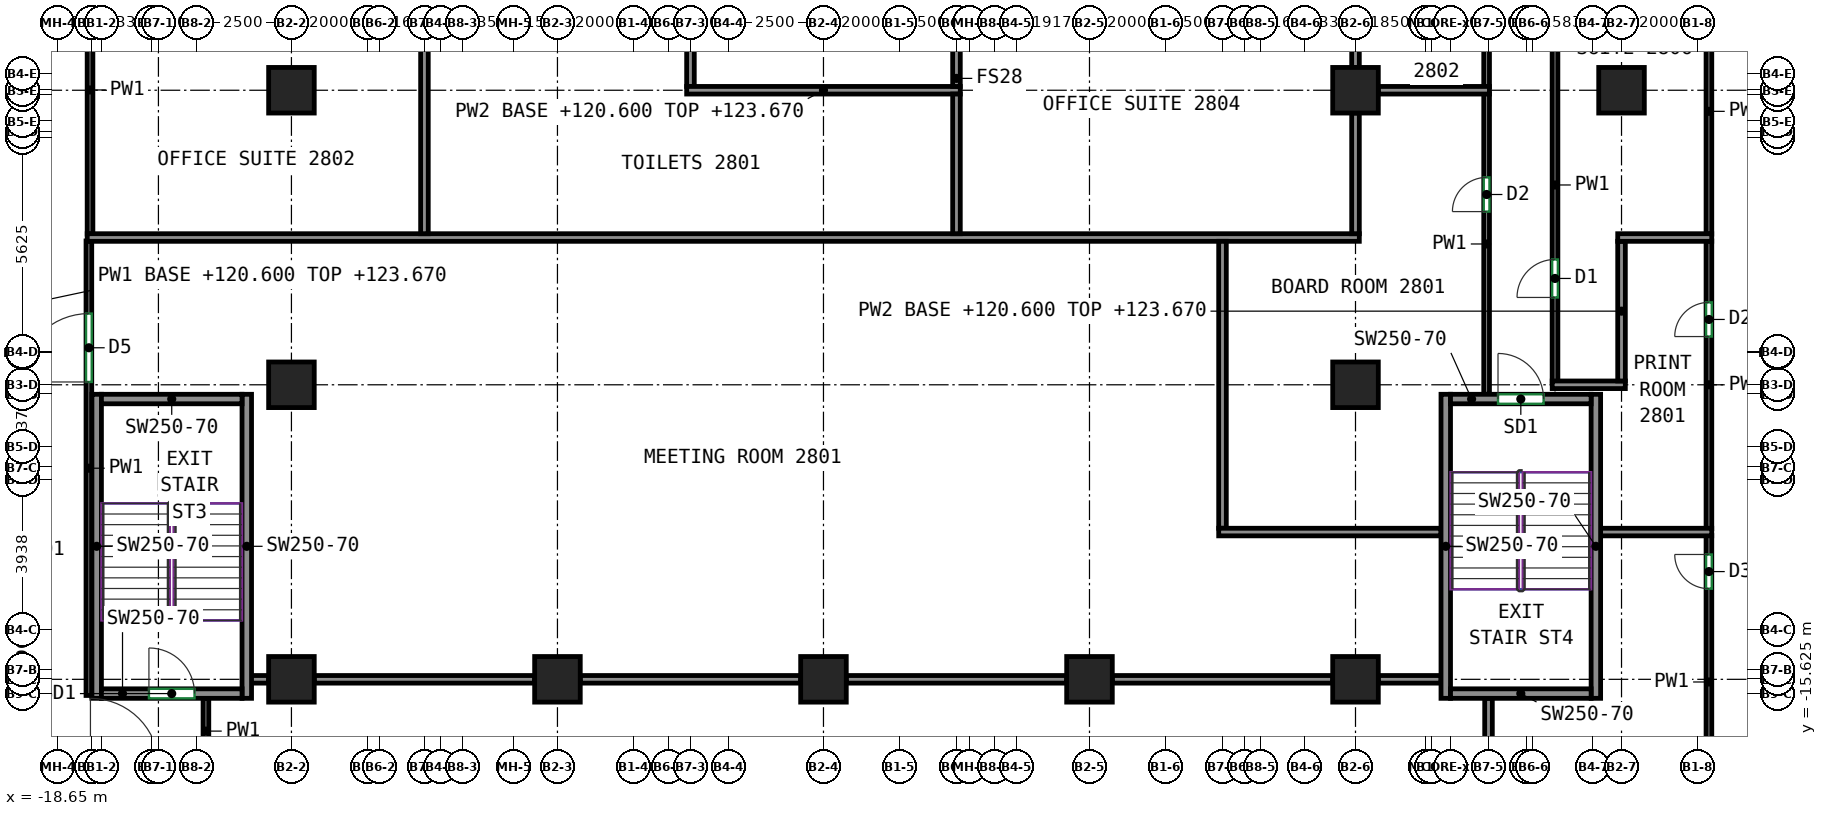
"""IFC4 building model, lengths in metres.
Left out: names, types, materials, properties, quantities, classifications, styles, units other than length and angle.
Written with IfcOpenShell. Run it as: python <this file> out.ifc"""

import sys

from ifc_helpers import new_model, si_unit, direction, frame, frame_2d, origin, origin_2d, place, context, subcontext, project, spatial, rectangle, extrude, source, transform, mapped, element, fill, save


model = new_model("IFC4")
c1 = context("Model", 3, precision=1e-05, world=origin(), true_north=direction((0.0, 1.0)))
c2 = subcontext(c1, "Body", "Model", "MODEL_VIEW")
j1 = project(units=[si_unit("LENGTHUNIT", "METRE"), si_unit("PLANEANGLEUNIT", "RADIAN")], contexts=[c1])
p1 = place(None, origin())
s1 = spatial("IfcSite", under=j1, at=p1, CompositionType="ELEMENT")
p2 = place(p1, origin())
s2 = spatial("IfcBuilding", under=s1, at=p2, CompositionType="ELEMENT")
p3 = place(p2, frame((0.0, 0.0, 120.6)))
s3 = spatial("IfcBuildingStorey", under=s2, at=p3, CompositionType="ELEMENT", Elevation=120.6)
m1 = source(origin(), c2, "Body", "SweptSolid", [
    extrude(rectangle(XDim=1.2, YDim=1.2, at=origin_2d()), origin(), (0.0, 0.0, 1.0), 3.72),
])
for number, where, z_axis, x_axis in (
    (1, (-12.5, -15.25, 0.0), (0.0, 0.0, 1.0), (1.0, 0.0, 0.0)),
    (2, (-12.5, -7.5, 0.0), (0.0, 0.0, 1.0), (1.0, 0.0, 0.0)),
    (3, (-12.5, 0.25, 0.0), (0.0, 0.0, 1.0), (1.0, 0.0, 0.0)),
    (4, (-5.5, -15.25, 0.0), (0.0, 0.0, 1.0), (1.0, 0.0, 0.0)),
    (5, (1.5, -15.25, 0.0), (0.0, 0.0, 1.0), (1.0, 0.0, 0.0)),
    (6, (8.5, -15.25, 0.0), (0.0, 0.0, 1.0), (1.0, 0.0, 0.0)),
    (7, (15.5, -15.25, 0.0), (0.0, 0.0, 1.0), (1.0, 0.0, 0.0)),
    (8, (15.5, -7.5, 0.0), (0.0, 0.0, 1.0), (1.0, 0.0, 0.0)),
    (9, (15.5, 0.25, 0.0), (0.0, 0.0, 1.0), (1.0, 0.0, 0.0)),
    (10, (22.5, 0.25, 0.0), (0.0, 0.0, 1.0), (1.0, 0.0, 0.0)),
):
    element("IfcColumn", number, at=place(p3, frame(where, z_axis=z_axis, x_axis=x_axis)), inside=s3, PredefinedType="COLUMN", context=c2, shape_type="MappedRepresentation", body=[
        mapped(m1, transform((0.0, 0.0, 0.0))),
    ])
m2 = source(origin(), c2, "Body", "SweptSolid", [
    extrude(rectangle(XDim=8.0, YDim=0.25, at=frame_2d((4.0, 0.0))), origin(), (0.0, 0.0, 1.0), 3.72),
])
for number, where, z_axis, x_axis in (
    (11, (-17.625, -15.75, 0.0), (0.0, 0.0, 1.0), (0.0, 1.0, 0.0)),
    (12, (-13.675, -15.75, 0.0), (0.0, 0.0, 1.0), (0.0, 1.0, 0.0)),
):
    element("IfcWall", number, at=place(p3, frame(where, z_axis=z_axis, x_axis=x_axis)), inside=s3, PredefinedType="SHEAR", context=c2, shape_type="MappedRepresentation", body=[
        mapped(m2, transform((0.0, 0.0, 0.0))),
    ])
m3 = source(origin(), c2, "Body", "SweptSolid", [
    extrude(rectangle(XDim=3.7, YDim=0.25, at=frame_2d((1.85, 0.0))), origin(), (0.0, 0.0, 1.0), 3.72),
])
p4 = place(p3, frame((-17.5, -15.625, 0.0), z_axis=(0.0, 0.0, 1.0), x_axis=(1.0, 0.0, 0.0)))
e13 = element("IfcWall", 13, at=p4, inside=s3, PredefinedType="SHEAR", context=c2, shape_type="MappedRepresentation", body=[
    mapped(m3, transform((0.0, 0.0, 0.0))),
])
p5 = place(p4, frame((1.25, 0.0, 0.0)))
e14 = element("IfcOpeningElement", 14, at=p5, cuts=e13, PredefinedType="OPENING", context=c2, shape_type="SweptSolid", body=[
    extrude(rectangle(XDim=1.2, YDim=2.1, at=frame_2d((0.6, 1.05))), frame((0.0, 0.135, 0.0), z_axis=(0.0, -1.0, 0.0), x_axis=(1.0, 0.0, 0.0)), (0.0, 0.0, 1.0), 0.27),
])
p6 = place(p3, frame((-17.5, -7.875, 0.0), z_axis=(0.0, 0.0, 1.0), x_axis=(1.0, 0.0, 0.0)))
e15 = element("IfcWall", 15, at=p6, inside=s3, PredefinedType="SHEAR", context=c2, shape_type="MappedRepresentation", body=[
    mapped(m3, transform((0.0, 0.0, 0.0))),
])
for number, where, z_axis, x_axis in (
    (16, (17.875, -15.75, 0.0), (0.0, 0.0, 1.0), (0.0, 1.0, 0.0)),
    (17, (21.825, -15.75, 0.0), (0.0, 0.0, 1.0), (0.0, 1.0, 0.0)),
):
    element("IfcWall", number, at=place(p3, frame(where, z_axis=z_axis, x_axis=x_axis)), inside=s3, PredefinedType="SHEAR", context=c2, shape_type="MappedRepresentation", body=[
        mapped(m2, transform((0.0, 0.0, 0.0))),
    ])
p7 = place(p3, frame((18.0, -15.625, 0.0), z_axis=(0.0, 0.0, 1.0), x_axis=(1.0, 0.0, 0.0)))
e18 = element("IfcWall", 18, at=p7, inside=s3, PredefinedType="SHEAR", context=c2, shape_type="MappedRepresentation", body=[
    mapped(m3, transform((0.0, 0.0, 0.0))),
])
p8 = place(p3, frame((18.0, -7.875, 0.0), z_axis=(0.0, 0.0, 1.0), x_axis=(1.0, 0.0, 0.0)))
e19 = element("IfcWall", 19, at=p8, inside=s3, PredefinedType="SHEAR", context=c2, shape_type="MappedRepresentation", body=[
    mapped(m3, transform((0.0, 0.0, 0.0))),
])
p9 = place(p8, frame((1.25, 0.0, 0.0)))
e20 = element("IfcOpeningElement", 20, at=p9, cuts=e19, PredefinedType="OPENING", context=c2, shape_type="SweptSolid", body=[
    extrude(rectangle(XDim=1.2, YDim=2.1, at=frame_2d((0.6, 1.05))), frame((0.0, 0.135, 0.0), z_axis=(0.0, -1.0, 0.0), x_axis=(1.0, 0.0, 0.0)), (0.0, 0.0, 1.0), 0.27),
])
p10 = place(p3, frame((-17.8, -3.535, 0.0), z_axis=(0.0, 0.0, 1.0), x_axis=(0.0, 1.0, 0.0)))
e21 = element("IfcWall", 21, at=p10, inside=s3, PredefinedType="PARTITIONING", context=c2, shape_type="SweptSolid", body=[
    extrude(rectangle(XDim=7.585, YDim=0.15, at=frame_2d((3.792, 0.0))), origin(), (0.0, 0.0, 1.0), 3.72),
])
p11 = place(p10, frame((5.067, 0.0, 0.0)))
e22 = element("IfcOpeningElement", 22, at=p11, cuts=e21, PredefinedType="OPENING", context=c2, shape_type="SweptSolid", body=[
    extrude(rectangle(XDim=1.0, YDim=2.1, at=frame_2d((0.5, 1.05))), frame((0.0, 0.085, 0.0), z_axis=(0.0, -1.0, 0.0), x_axis=(1.0, 0.0, 0.0)), (0.0, 0.0, 1.0), 0.17),
])
p12 = place(p3, frame((-17.83, -15.675, 0.0), z_axis=(0.0, 0.0, 1.0), x_axis=(0.0, 1.0, 0.0)))
e23 = element("IfcWall", 23, at=p12, inside=s3, PredefinedType="PARTITIONING", context=c2, shape_type="SweptSolid", body=[
    extrude(rectangle(XDim=11.96, YDim=0.15, at=frame_2d((5.98, 0.0))), origin(), (0.0, 0.0, 1.0), 3.72),
])
p13 = place(p12, frame((8.249, 0.0, 0.0)))
e24 = element("IfcOpeningElement", 24, at=p13, cuts=e23, PredefinedType="OPENING", context=c2, shape_type="SweptSolid", body=[
    extrude(rectangle(XDim=1.8, YDim=2.1, at=frame_2d((0.9, 1.05))), frame((0.0, 0.085, 0.0), z_axis=(0.0, -1.0, 0.0), x_axis=(1.0, 0.0, 0.0)), (0.0, 0.0, 1.0), 0.17),
])
p14 = place(p3, frame((-14.75, -17.475, 0.0), z_axis=(0.0, 0.0, 1.0), x_axis=(0.0, 1.0, 0.0)))
e25 = element("IfcWall", 25, at=p14, inside=s3, PredefinedType="PARTITIONING", context=c2, shape_type="SweptSolid", body=[
    extrude(rectangle(XDim=1.725, YDim=0.15, at=frame_2d((0.863, 0.0))), origin(), (0.0, 0.0, 1.0), 3.72),
])
p15 = place(p3, frame((18.95, -7.75, 0.0), z_axis=(0.0, 0.0, 1.0), x_axis=(0.0, 1.0, 0.0)))
e26 = element("IfcWall", 26, at=p15, inside=s3, PredefinedType="PARTITIONING", context=c2, shape_type="SweptSolid", body=[
    extrude(rectangle(XDim=7.91, YDim=0.15, at=frame_2d((3.955, 0.0))), origin(), (0.0, 0.0, 1.0), 3.72),
])
p16 = place(p15, frame((4.807, 0.0, 0.0)))
e27 = element("IfcOpeningElement", 27, at=p16, cuts=e26, PredefinedType="OPENING", context=c2, shape_type="SweptSolid", body=[
    extrude(rectangle(XDim=0.9, YDim=2.1, at=frame_2d((0.45, 1.05))), frame((0.0, 0.085, 0.0), z_axis=(0.0, -1.0, 0.0), x_axis=(1.0, 0.0, 0.0)), (0.0, 0.0, 1.0), 0.17),
])
p17 = place(p3, frame((24.8, -19.175, 0.0), z_axis=(0.0, 0.0, 1.0), x_axis=(0.0, 1.0, 0.0)))
e28 = element("IfcWall", 28, at=p17, inside=s3, PredefinedType="PARTITIONING", context=c2, shape_type="SweptSolid", body=[
    extrude(rectangle(XDim=7.71, YDim=0.15, at=frame_2d((3.855, 0.0))), origin(), (0.0, 0.0, 1.0), 3.72),
])
p18 = place(p17, frame((6.31, 0.0, 0.0)))
e29 = element("IfcOpeningElement", 29, at=p18, cuts=e28, PredefinedType="OPENING", context=c2, shape_type="SweptSolid", body=[
    extrude(rectangle(XDim=0.9, YDim=2.1, at=frame_2d((0.45, 1.05))), frame((0.0, 0.085, 0.0), z_axis=(0.0, -1.0, 0.0), x_axis=(1.0, 0.0, 0.0)), (0.0, 0.0, 1.0), 0.17),
])
p19 = place(p3, frame((24.8, -11.285, 0.0), z_axis=(0.0, 0.0, 1.0), x_axis=(0.0, 1.0, 0.0)))
e30 = element("IfcWall", 30, at=p19, inside=s3, PredefinedType="PARTITIONING", context=c2, shape_type="SweptSolid", body=[
    extrude(rectangle(XDim=7.57, YDim=0.15, at=frame_2d((3.785, 0.0))), origin(), (0.0, 0.0, 1.0), 3.72),
])
p20 = place(p19, frame((5.054, 0.0, 0.0)))
e31 = element("IfcOpeningElement", 31, at=p20, cuts=e30, PredefinedType="OPENING", context=c2, shape_type="SweptSolid", body=[
    extrude(rectangle(XDim=0.9, YDim=2.1, at=frame_2d((0.45, 1.05))), frame((0.0, 0.085, 0.0), z_axis=(0.0, -1.0, 0.0), x_axis=(1.0, 0.0, 0.0)), (0.0, 0.0, 1.0), 0.17),
])
p21 = place(p3, frame((24.8, -3.535, 0.0), z_axis=(0.0, 0.0, 1.0), x_axis=(0.0, 1.0, 0.0)))
e32 = element("IfcWall", 32, at=p21, inside=s3, PredefinedType="PARTITIONING", context=c2, shape_type="SweptSolid", body=[
    extrude(rectangle(XDim=6.46, YDim=0.15, at=frame_2d((3.23, 0.0))), origin(), (0.0, 0.0, 1.0), 3.72),
])
p22 = place(p3, frame((20.75, -7.41, 0.0), z_axis=(0.0, 0.0, 1.0), x_axis=(0.0, 1.0, 0.0)))
e33 = element("IfcWall", 33, at=p22, inside=s3, PredefinedType="PARTITIONING", context=c2, shape_type="SweptSolid", body=[
    extrude(rectangle(XDim=10.335, YDim=0.15, at=frame_2d((5.167, 0.0))), origin(), (0.0, 0.0, 1.0), 3.72),
])
p23 = place(p22, frame((2.208, 0.0, 0.0)))
e34 = element("IfcOpeningElement", 34, at=p23, cuts=e33, PredefinedType="OPENING", context=c2, shape_type="SweptSolid", body=[
    extrude(rectangle(XDim=1.0, YDim=2.1, at=frame_2d((0.5, 1.05))), frame((0.0, 0.085, 0.0), z_axis=(0.0, -1.0, 0.0), x_axis=(1.0, 0.0, 0.0)), (0.0, 0.0, 1.0), 0.17),
])
p24 = place(p3, frame((18.95, 0.34, 0.0), z_axis=(0.0, 0.0, 1.0), x_axis=(0.0, 1.0, 0.0)))
e35 = element("IfcWall", 35, at=p24, inside=s3, PredefinedType="PARTITIONING", context=c2, shape_type="SweptSolid", body=[
    extrude(rectangle(XDim=2.908, YDim=0.15, at=frame_2d((1.454, 0.0))), origin(), (0.0, 0.0, 1.0), 3.72),
])
p25 = place(p3, frame((-17.874, -3.625, 0.0), z_axis=(0.0, 0.0, 1.0), x_axis=(1.0, 0.0, 0.0)))
e36 = element("IfcWall", 36, at=p25, inside=s3, PredefinedType="PARTITIONING", context=c2, shape_type="SweptSolid", body=[
    extrude(rectangle(XDim=33.474, YDim=0.2, at=frame_2d((16.737, 0.0))), origin(), (0.0, 0.0, 1.0), 3.72),
])
p26 = place(p3, frame((-9.0, -3.525, 0.0), z_axis=(0.0, 0.0, 1.0), x_axis=(0.0, 1.0, 0.0)))
e37 = element("IfcWall", 37, at=p26, inside=s3, PredefinedType="PARTITIONING", context=c2, shape_type="SweptSolid", body=[
    extrude(rectangle(XDim=6.399, YDim=0.2, at=frame_2d((3.199, 0.0))), origin(), (0.0, 0.0, 1.0), 3.72),
])
p27 = place(p3, frame((16.1, -15.25, 0.0), z_axis=(0.0, 0.0, 1.0), x_axis=(1.0, 0.0, 0.0)))
e38 = element("IfcWall", 38, at=p27, inside=s3, PredefinedType="PARTITIONING", context=c2, shape_type="SweptSolid", body=[
    extrude(rectangle(XDim=1.65, YDim=0.2, at=frame_2d((0.825, 0.0))), origin(), (0.0, 0.0, 1.0), 3.72),
])
for number, where, z_axis, x_axis in (
    (39, (9.1, -15.25, 0.0), (0.0, 0.0, 1.0), (1.0, 0.0, 0.0)),
    (40, (2.1, -15.25, 0.0), (0.0, 0.0, 1.0), (1.0, 0.0, 0.0)),
    (41, (-4.9, -15.25, 0.0), (0.0, 0.0, 1.0), (1.0, 0.0, 0.0)),
    (42, (-11.9, -15.25, 0.0), (0.0, 0.0, 1.0), (1.0, 0.0, 0.0)),
):
    element("IfcWall", number, at=place(p3, frame(where, z_axis=z_axis, x_axis=x_axis)), inside=s3, PredefinedType="PARTITIONING", context=c2, shape_type="SweptSolid", body=[
        extrude(rectangle(XDim=5.8, YDim=0.2, at=frame_2d((2.9, 0.0))), origin(), (0.0, 0.0, 1.0), 3.72),
    ])
p28 = place(p3, frame((-13.6, -15.25, 0.0), z_axis=(0.0, 0.0, 1.0), x_axis=(1.0, 0.0, 0.0)))
e43 = element("IfcWall", 43, at=p28, inside=s3, PredefinedType="PARTITIONING", context=c2, shape_type="SweptSolid", body=[
    extrude(rectangle(XDim=0.5, YDim=0.2, at=frame_2d((0.25, 0.0))), origin(), (0.0, 0.0, 1.0), 3.72),
])
p29 = place(p3, frame((12.0, -11.275, 0.0), z_axis=(0.0, 0.0, 1.0), x_axis=(0.0, 1.0, 0.0)))
e44 = element("IfcWall", 44, at=p29, inside=s3, PredefinedType="PARTITIONING", context=c2, shape_type="SweptSolid", body=[
    extrude(rectangle(XDim=7.55, YDim=0.2, at=frame_2d((3.775, 0.0))), origin(), (0.0, 0.0, 1.0), 3.72),
])
p30 = place(p3, frame((11.9, -11.375, 0.0), z_axis=(0.0, 0.0, 1.0), x_axis=(1.0, 0.0, 0.0)))
e45 = element("IfcWall", 45, at=p30, inside=s3, PredefinedType="PARTITIONING", context=c2, shape_type="SweptSolid", body=[
    extrude(rectangle(XDim=5.85, YDim=0.2, at=frame_2d((2.925, 0.0))), origin(), (0.0, 0.0, 1.0), 3.72),
])
p31 = place(p3, frame((19.0, -22.75, 0.0), z_axis=(0.0, 0.0, 1.0), x_axis=(0.0, 1.0, 0.0)))
e46 = element("IfcWall", 46, at=p31, inside=s3, PredefinedType="PARTITIONING", context=c2, shape_type="SweptSolid", body=[
    extrude(rectangle(XDim=7.0, YDim=0.2, at=frame_2d((3.5, 0.0))), origin(), (0.0, 0.0, 1.0), 3.72),
])
p32 = place(p3, frame((-2.0, 0.35, 0.0), z_axis=(0.0, 0.0, 1.0), x_axis=(0.0, 1.0, 0.0)))
e47 = element("IfcWall", 47, at=p32, inside=s3, PredefinedType="PARTITIONING", context=c2, shape_type="SweptSolid", body=[
    extrude(rectangle(XDim=2.524, YDim=0.2, at=frame_2d((1.262, 0.0))), origin(), (0.0, 0.0, 1.0), 3.72),
])
p33 = place(p3, frame((-2.1, 0.25, 0.0), z_axis=(0.0, 0.0, 1.0), x_axis=(1.0, 0.0, 0.0)))
e48 = element("IfcWall", 48, at=p33, inside=s3, PredefinedType="PARTITIONING", context=c2, shape_type="SweptSolid", body=[
    extrude(rectangle(XDim=7.2, YDim=0.2, at=frame_2d((3.6, 0.0))), origin(), (0.0, 0.0, 1.0), 3.07),
])
p34 = place(p3, frame((5.0, -3.525, 0.0), z_axis=(0.0, 0.0, 1.0), x_axis=(0.0, 1.0, 0.0)))
e49 = element("IfcWall", 49, at=p34, inside=s3, PredefinedType="PARTITIONING", context=c2, shape_type="SweptSolid", body=[
    extrude(rectangle(XDim=3.675, YDim=0.2, at=frame_2d((1.837, 0.0))), origin(), (0.0, 0.0, 1.0), 3.72),
])
p35 = place(p3, frame((5.0, 0.35, 0.0), z_axis=(0.0, 0.0, 1.0), x_axis=(0.0, 1.0, 0.0)))
e50 = element("IfcWall", 50, at=p35, inside=s3, PredefinedType="PARTITIONING", context=c2, shape_type="SweptSolid", body=[
    extrude(rectangle(XDim=3.699, YDim=0.2, at=frame_2d((1.85, 0.0))), origin(), (0.0, 0.0, 1.0), 3.72),
])
p36 = place(p3, frame((15.5, -3.525, 0.0), z_axis=(0.0, 0.0, 1.0), x_axis=(0.0, 1.0, 0.0)))
e51 = element("IfcWall", 51, at=p36, inside=s3, PredefinedType="PARTITIONING", context=c2, shape_type="SweptSolid", body=[
    extrude(rectangle(XDim=3.175, YDim=0.2, at=frame_2d((1.587, 0.0))), origin(), (0.0, 0.0, 1.0), 3.72),
])
p37 = place(p3, frame((15.5, 0.85, 0.0), z_axis=(0.0, 0.0, 1.0), x_axis=(0.0, 1.0, 0.0)))
e52 = element("IfcWall", 52, at=p37, inside=s3, PredefinedType="PARTITIONING", context=c2, shape_type="SweptSolid", body=[
    extrude(rectangle(XDim=2.024, YDim=0.2, at=frame_2d((1.012, 0.0))), origin(), (0.0, 0.0, 1.0), 3.72),
])
p38 = place(p3, frame((16.1, 0.25, 0.0), z_axis=(0.0, 0.0, 1.0), x_axis=(1.0, 0.0, 0.0)))
e53 = element("IfcWall", 53, at=p38, inside=s3, PredefinedType="PARTITIONING", context=c2, shape_type="SweptSolid", body=[
    extrude(rectangle(XDim=2.924, YDim=0.2, at=frame_2d((1.462, 0.0))), origin(), (0.0, 0.0, 1.0), 3.72),
])
p39 = place(p3, frame((21.95, -11.375, 0.0), z_axis=(0.0, 0.0, 1.0), x_axis=(1.0, 0.0, 0.0)))
e54 = element("IfcWall", 54, at=p39, inside=s3, PredefinedType="PARTITIONING", context=c2, shape_type="SweptSolid", body=[
    extrude(rectangle(XDim=2.924, YDim=0.2, at=frame_2d((1.462, 0.0))), origin(), (0.0, 0.0, 1.0), 3.72),
])
p40 = place(p3, frame((22.6, -7.5, 0.0), z_axis=(0.0, 0.0, 1.0), x_axis=(-1.0, 0.0, 0.0)))
e55 = element("IfcWall", 55, at=p40, inside=s3, PredefinedType="PARTITIONING", context=c2, shape_type="SweptSolid", body=[
    extrude(rectangle(XDim=1.924, YDim=0.2, at=frame_2d((0.962, 0.0))), origin(), (0.0, 0.0, 1.0), 3.72),
])
p41 = place(p3, frame((22.5, -3.725, 0.0), z_axis=(0.0, 0.0, 1.0), x_axis=(0.0, -1.0, 0.0)))
e56 = element("IfcWall", 56, at=p41, inside=s3, PredefinedType="PARTITIONING", context=c2, shape_type="SweptSolid", body=[
    extrude(rectangle(XDim=3.675, YDim=0.2, at=frame_2d((1.837, 0.0))), origin(), (0.0, 0.0, 1.0), 3.07),
])
p42 = place(p3, frame((22.4, -3.625, 0.0), z_axis=(0.0, 0.0, 1.0), x_axis=(1.0, 0.0, 0.0)))
e57 = element("IfcWall", 57, at=p42, inside=s3, PredefinedType="PARTITIONING", context=c2, shape_type="SweptSolid", body=[
    extrude(rectangle(XDim=2.474, YDim=0.2, at=frame_2d((1.237, 0.0))), origin(), (0.0, 0.0, 1.0), 3.72),
])
p43 = place(p5, origin())
e58 = element("IfcDoor", 58, at=p43, inside=s3, OperationType="DOUBLE_DOOR_SINGLE_SWING", PredefinedType="DOOR", context=c2, shape_type="SweptSolid", body=[
    extrude(rectangle(XDim=1.2, YDim=2.1, at=frame_2d((0.6, 1.05))), frame((0.0, 0.025, 0.0), z_axis=(0.0, -1.0, 0.0), x_axis=(1.0, 0.0, 0.0)), (0.0, 0.0, 1.0), 0.05),
])
fill(e14, e58)
p44 = place(p9, origin())
e59 = element("IfcDoor", 59, at=p44, inside=s3, OperationType="DOUBLE_DOOR_SINGLE_SWING", PredefinedType="DOOR", context=c2, shape_type="SweptSolid", body=[
    extrude(rectangle(XDim=1.2, YDim=2.1, at=frame_2d((0.6, 1.05))), frame((0.0, 0.025, 0.0), z_axis=(0.0, -1.0, 0.0), x_axis=(1.0, 0.0, 0.0)), (0.0, 0.0, 1.0), 0.05),
])
fill(e20, e59)
p45 = place(p18, origin())
e60 = element("IfcDoor", 60, at=p45, inside=s3, OperationType="SINGLE_SWING_RIGHT", PredefinedType="DOOR", context=c2, shape_type="SweptSolid", body=[
    extrude(rectangle(XDim=0.9, YDim=2.1, at=frame_2d((0.45, 1.05))), frame((0.0, 0.025, 0.0), z_axis=(0.0, -1.0, 0.0), x_axis=(1.0, 0.0, 0.0)), (0.0, 0.0, 1.0), 0.05),
])
fill(e29, e60)
p46 = place(p13, origin())
e61 = element("IfcDoor", 61, at=p46, inside=s3, OperationType="DOUBLE_DOOR_SINGLE_SWING", PredefinedType="DOOR", context=c2, shape_type="SweptSolid", body=[
    extrude(rectangle(XDim=1.8, YDim=2.1, at=frame_2d((0.9, 1.05))), frame((0.0, 0.025, 0.0), z_axis=(0.0, -1.0, 0.0), x_axis=(1.0, 0.0, 0.0)), (0.0, 0.0, 1.0), 0.05),
])
fill(e24, e61)
p47 = place(p20, origin())
e62 = element("IfcDoor", 62, at=p47, inside=s3, OperationType="SINGLE_SWING_LEFT", PredefinedType="DOOR", context=c2, shape_type="SweptSolid", body=[
    extrude(rectangle(XDim=0.9, YDim=2.1, at=frame_2d((0.45, 1.05))), frame((0.0, 0.025, 0.0), z_axis=(0.0, -1.0, 0.0), x_axis=(1.0, 0.0, 0.0)), (0.0, 0.0, 1.0), 0.05),
])
fill(e31, e62)
p48 = place(p23, origin())
e63 = element("IfcDoor", 63, at=p48, inside=s3, OperationType="SINGLE_SWING_LEFT", PredefinedType="DOOR", context=c2, shape_type="SweptSolid", body=[
    extrude(rectangle(XDim=1.0, YDim=2.1, at=frame_2d((0.5, 1.05))), frame((0.0, 0.025, 0.0), z_axis=(0.0, -1.0, 0.0), x_axis=(1.0, 0.0, 0.0)), (0.0, 0.0, 1.0), 0.05),
])
fill(e34, e63)
p49 = place(p16, origin())
e64 = element("IfcDoor", 64, at=p49, inside=s3, OperationType="SINGLE_SWING_LEFT", PredefinedType="DOOR", context=c2, shape_type="SweptSolid", body=[
    extrude(rectangle(XDim=0.9, YDim=2.1, at=frame_2d((0.45, 1.05))), frame((0.0, 0.025, 0.0), z_axis=(0.0, -1.0, 0.0), x_axis=(1.0, 0.0, 0.0)), (0.0, 0.0, 1.0), 0.05),
])
fill(e27, e64)
save(model, sys.argv[1])
